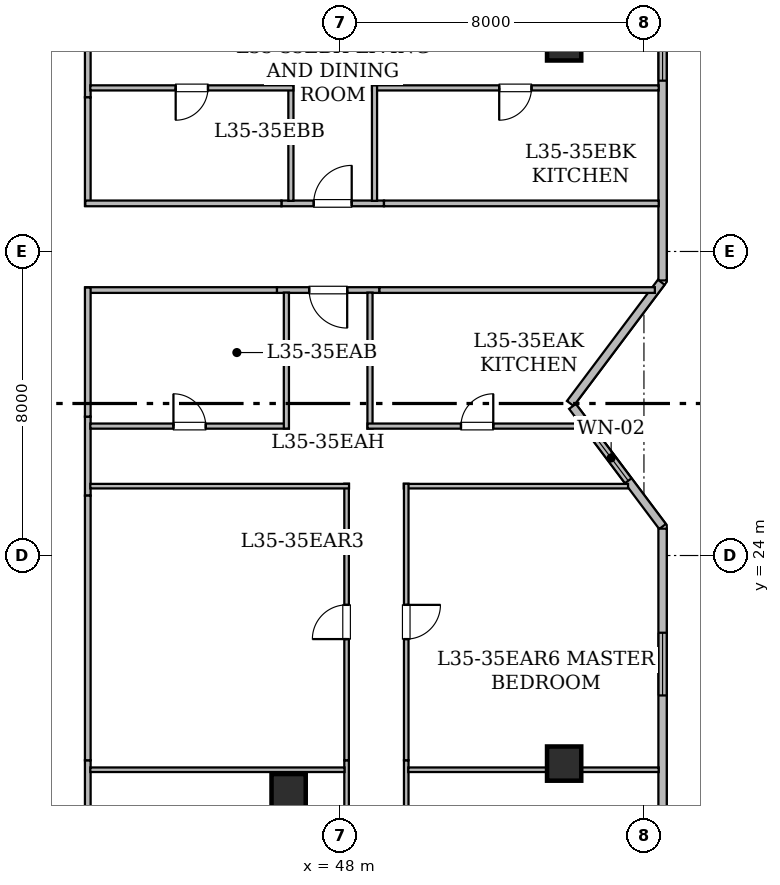
"""IFC4 building model, lengths in metres.
Left out: names, types, materials, properties, quantities, classifications, styles, units other than length and angle.
Written with IfcOpenShell. Run it as: python <this file> out.ifc"""

import sys

from ifc_helpers import new_model, si_unit, direction, frame, frame_2d, origin, origin_2d, place, context, subcontext, project, spatial, rectangle, hollow_rectangle, extrude, element, fill, save


model = new_model("IFC4")
c1 = context("Model", 3, precision=1e-05, world=origin(), true_north=direction((0.0, 1.0)))
c2 = subcontext(c1, "Body", "Model", "MODEL_VIEW")
j1 = project(units=[si_unit("LENGTHUNIT", "METRE"), si_unit("PLANEANGLEUNIT", "RADIAN")], contexts=[c1])
p1 = place(None, origin())
s1 = spatial("IfcSite", under=j1, at=p1, CompositionType="ELEMENT")
p2 = place(p1, origin())
s2 = spatial("IfcBuilding", under=s1, at=p2, CompositionType="ELEMENT")
p3 = place(p2, frame((0.0, 0.0, 138.4)))
s3 = spatial("IfcBuildingStorey", under=s2, at=p3, CompositionType="ELEMENT", Elevation=138.4)
for number, where, z_axis, x_axis in (
    (1, (53.9, 18.525, 0.0), (0.0, 0.0, 1.0), (1.0, 0.0, 0.0)),
    (2, (53.9, 37.475, 0.0), (0.0, 0.0, 1.0), (1.0, 0.0, 0.0)),
    (3, (46.65, 17.8, 0.0), (0.0, 0.0, 1.0), (1.0, 0.0, 0.0)),
):
    element("IfcColumn", number, at=place(p3, frame(where, z_axis=z_axis, x_axis=x_axis)), inside=s3, PredefinedType="COLUMN", context=c2, shape_type="SweptSolid", body=[
        extrude(hollow_rectangle(XDim=0.9, YDim=0.9, WallThickness=0.045, at=origin_2d()), origin(), (0.0, 0.0, 1.0), 3.65),
    ])
p4 = place(p3, frame((56.49, 45.283, 0.0), z_axis=(0.0, 0.0, 1.0), x_axis=(0.0, -1.0, 0.0)))
e4 = element("IfcWall", 4, at=p4, inside=s3, PredefinedType="STANDARD", context=c2, shape_type="SweptSolid", body=[
    extrude(rectangle(XDim=14.046, YDim=0.22, at=frame_2d((7.023, 0.0))), origin(), (0.0, 0.0, 1.0), 3.43),
])
p5 = place(p4, frame((7.589, 0.0, 0.8)))
e5 = element("IfcOpeningElement", 5, at=p5, cuts=e4, PredefinedType="OPENING", context=c2, shape_type="SweptSolid", body=[
    extrude(rectangle(XDim=1.2, YDim=1.5, at=frame_2d((0.6, 0.75))), frame((0.0, 0.12, 0.0), z_axis=(0.0, -1.0, 0.0), x_axis=(1.0, 0.0, 0.0)), (0.0, 0.0, 1.0), 0.24),
])
p6 = place(p4, frame((3.267, 0.0, 0.85)))
e6 = element("IfcOpeningElement", 6, at=p6, cuts=e4, PredefinedType="OPENING", context=c2, shape_type="SweptSolid", body=[
    extrude(rectangle(XDim=1.65, YDim=1.55, at=frame_2d((0.825, 0.775))), frame((0.0, 0.12, 0.0), z_axis=(0.0, -1.0, 0.0), x_axis=(1.0, 0.0, 0.0)), (0.0, 0.0, 1.0), 0.24),
])
p7 = place(p3, frame((56.456, 31.191, 0.0), z_axis=(0.0, 0.0, 1.0), x_axis=(-0.600137081448, -0.799897170561, 0.0)))
e7 = element("IfcWall", 7, at=p7, inside=s3, PredefinedType="STANDARD", context=c2, shape_type="SweptSolid", body=[
    extrude(rectangle(XDim=3.989, YDim=0.22, at=frame_2d((1.995, 0.0))), origin(), (0.0, 0.0, 1.0), 3.43),
])
p8 = place(p3, frame((54.119, 27.924, 0.0), z_axis=(0.0, 0.0, 1.0), x_axis=(0.600039540588, -0.799970343032, 0.0)))
e8 = element("IfcWall", 8, at=p8, inside=s3, PredefinedType="STANDARD", context=c2, shape_type="SweptSolid", body=[
    extrude(rectangle(XDim=3.952, YDim=0.22, at=frame_2d((1.976, 0.0))), origin(), (0.0, 0.0, 1.0), 3.43),
])
p9 = place(p8, frame((0.946, 0.0, 0.85)))
e9 = element("IfcOpeningElement", 9, at=p9, cuts=e8, PredefinedType="OPENING", context=c2, shape_type="SweptSolid", body=[
    extrude(rectangle(XDim=1.5, YDim=1.6, at=frame_2d((0.75, 0.8))), frame((0.0, 0.12, 0.0), z_axis=(0.0, -1.0, 0.0), x_axis=(1.0, 0.0, 0.0)), (0.0, 0.0, 1.0), 0.24),
])
p10 = place(p3, frame((56.49, 24.707, 0.0), z_axis=(0.0, 0.0, 1.0), x_axis=(0.0, -1.0, 0.0)))
e10 = element("IfcWall", 10, at=p10, inside=s3, PredefinedType="STANDARD", context=c2, shape_type="SweptSolid", body=[
    extrude(rectangle(XDim=14.061, YDim=0.22, at=frame_2d((7.031, 0.0))), origin(), (0.0, 0.0, 1.0), 3.43),
])
p11 = place(p10, frame((8.727, 0.0, 0.85)))
e11 = element("IfcOpeningElement", 11, at=p11, cuts=e10, PredefinedType="OPENING", context=c2, shape_type="SweptSolid", body=[
    extrude(rectangle(XDim=1.65, YDim=1.55, at=frame_2d((0.825, 0.775))), frame((0.0, 0.12, 0.0), z_axis=(0.0, -1.0, 0.0), x_axis=(1.0, 0.0, 0.0)), (0.0, 0.0, 1.0), 0.24),
])
p12 = place(p10, frame((2.739, 0.0, 0.85)))
e12 = element("IfcOpeningElement", 12, at=p12, cuts=e10, PredefinedType="OPENING", context=c2, shape_type="SweptSolid", body=[
    extrude(rectangle(XDim=1.65, YDim=1.55, at=frame_2d((0.825, 0.775))), frame((0.0, 0.12, 0.0), z_axis=(0.0, -1.0, 0.0), x_axis=(1.0, 0.0, 0.0)), (0.0, 0.0, 1.0), 0.24),
])
p13 = place(p3, frame((49.04, 30.985, 0.0), z_axis=(0.0, 0.0, 1.0), x_axis=(-1.0, 0.0, 0.0)))
e13 = element("IfcWall", 13, at=p13, inside=s3, PredefinedType="STANDARD", context=c2, shape_type="SweptSolid", body=[
    extrude(rectangle(XDim=2.698, YDim=0.15, at=frame_2d((1.349, 0.0))), origin(), (0.0, 0.0, 1.0), 2.647),
])
p14 = place(p13, frame((0.849, 0.0, 0.0)))
e14 = element("IfcOpeningElement", 14, at=p14, cuts=e13, PredefinedType="OPENING", context=c2, shape_type="SweptSolid", body=[
    extrude(rectangle(XDim=1.0, YDim=2.15, at=frame_2d((0.5, 1.075))), frame((0.0, 0.085, 0.0), z_axis=(0.0, -1.0, 0.0), x_axis=(1.0, 0.0, 0.0)), (0.0, 0.0, 1.0), 0.17),
])
p15 = place(p3, frame((41.365, 27.654, 0.0), z_axis=(0.0, 0.0, 1.0), x_axis=(0.0, -1.0, 0.0)))
e15 = element("IfcWall", 15, at=p15, inside=s3, PredefinedType="STANDARD", context=c2, shape_type="SweptSolid", body=[
    extrude(rectangle(XDim=2.078, YDim=0.15, at=frame_2d((1.039, 0.0))), origin(), (0.0, 0.0, 1.0), 3.43),
])
p16 = place(p3, frame((46.342, 30.985, 0.0), z_axis=(0.0, 0.0, 1.0), x_axis=(-1.0, 0.0, 0.0)))
e16 = element("IfcWall", 16, at=p16, inside=s3, PredefinedType="STANDARD", context=c2, shape_type="SweptSolid", body=[
    extrude(rectangle(XDim=5.042, YDim=0.15, at=frame_2d((2.521, 0.0))), origin(), (0.0, 0.0, 1.0), 3.43),
])
p17 = place(p3, frame((41.365, 31.05, 0.0), z_axis=(0.0, 0.0, 1.0), x_axis=(0.0, -1.0, 0.0)))
e17 = element("IfcWall", 17, at=p17, inside=s3, PredefinedType="STANDARD", context=c2, shape_type="SweptSolid", body=[
    extrude(rectangle(XDim=3.396, YDim=0.15, at=frame_2d((1.698, 0.0))), origin(), (0.0, 0.0, 1.0), 3.013),
])
p18 = place(p3, frame((56.287, 30.985, 0.0), z_axis=(0.0, 0.0, 1.0), x_axis=(-1.0, 0.0, 0.0)))
e18 = element("IfcWall", 18, at=p18, inside=s3, PredefinedType="STANDARD", context=c2, shape_type="SweptSolid", body=[
    extrude(rectangle(XDim=7.247, YDim=0.15, at=frame_2d((3.624, 0.0))), origin(), (0.0, 0.0, 1.0), 2.876),
])
p19 = place(p3, frame((41.365, 18.612, 0.0), z_axis=(0.0, 0.0, 1.0), x_axis=(0.0, -1.0, 0.0)))
e19 = element("IfcWall", 19, at=p19, inside=s3, PredefinedType="STANDARD", context=c2, shape_type="SweptSolid", body=[
    extrude(rectangle(XDim=1.712, YDim=0.15, at=frame_2d((0.856, 0.0))), origin(), (0.0, 0.0, 1.0), 2.647),
])
p20 = place(p3, frame((41.365, 25.576, 0.0), z_axis=(0.0, 0.0, 1.0), x_axis=(0.0, -1.0, 0.0)))
e20 = element("IfcWall", 20, at=p20, inside=s3, PredefinedType="STANDARD", context=c2, shape_type="SweptSolid", body=[
    extrude(rectangle(XDim=6.964, YDim=0.15, at=frame_2d((3.482, 0.0))), origin(), (0.0, 0.0, 1.0), 2.647),
])
p21 = place(p3, frame((41.365, 38.133, 0.0), z_axis=(0.0, 0.0, 1.0), x_axis=(0.0, -1.0, 0.0)))
e21 = element("IfcWall", 21, at=p21, inside=s3, PredefinedType="STANDARD", context=c2, shape_type="SweptSolid", body=[
    extrude(rectangle(XDim=2.078, YDim=0.15, at=frame_2d((1.039, 0.0))), origin(), (0.0, 0.0, 1.0), 2.647),
])
p22 = place(p3, frame((46.461, 33.265, 0.0), z_axis=(0.0, 0.0, 1.0), x_axis=(1.0, 0.0, 0.0)))
e22 = element("IfcWall", 22, at=p22, inside=s3, PredefinedType="STANDARD", context=c2, shape_type="SweptSolid", body=[
    extrude(rectangle(XDim=2.698, YDim=0.15, at=frame_2d((1.349, 0.0))), origin(), (0.0, 0.0, 1.0), 2.647),
])
p23 = place(p22, frame((0.849, 0.0, 0.0)))
e23 = element("IfcOpeningElement", 23, at=p23, cuts=e22, PredefinedType="OPENING", context=c2, shape_type="SweptSolid", body=[
    extrude(rectangle(XDim=1.0, YDim=2.15, at=frame_2d((0.5, 1.075))), frame((0.0, 0.085, 0.0), z_axis=(0.0, -1.0, 0.0), x_axis=(1.0, 0.0, 0.0)), (0.0, 0.0, 1.0), 0.17),
])
p24 = place(p3, frame((41.365, 36.055, 0.0), z_axis=(0.0, 0.0, 1.0), x_axis=(0.0, -1.0, 0.0)))
e24 = element("IfcWall", 24, at=p24, inside=s3, PredefinedType="STANDARD", context=c2, shape_type="SweptSolid", body=[
    extrude(rectangle(XDim=2.855, YDim=0.15, at=frame_2d((1.427, 0.0))), origin(), (0.0, 0.0, 1.0), 3.43),
])
p25 = place(p3, frame((41.3, 33.265, 0.0), z_axis=(0.0, 0.0, 1.0), x_axis=(1.0, 0.0, 0.0)))
e25 = element("IfcWall", 25, at=p25, inside=s3, PredefinedType="STANDARD", context=c2, shape_type="SweptSolid", body=[
    extrude(rectangle(XDim=5.161, YDim=0.15, at=frame_2d((2.581, 0.0))), origin(), (0.0, 0.0, 1.0), 2.647),
])
p26 = place(p3, frame((49.159, 33.265, 0.0), z_axis=(0.0, 0.0, 1.0), x_axis=(1.0, 0.0, 0.0)))
e26 = element("IfcWall", 26, at=p26, inside=s3, PredefinedType="STANDARD", context=c2, shape_type="SweptSolid", body=[
    extrude(rectangle(XDim=7.229, YDim=0.15, at=frame_2d((3.615, 0.0))), origin(), (0.0, 0.0, 1.0), 2.876),
])
p27 = place(p3, frame((41.432, 27.405, 0.0), z_axis=(0.0, 0.0, 1.0), x_axis=(1.0, 0.0, 0.0)))
e27 = element("IfcWall", 27, at=p27, inside=s3, PredefinedType="PARTITIONING", context=c2, shape_type="SweptSolid", body=[
    extrude(rectangle(XDim=5.224, YDim=0.135, at=frame_2d((2.612, 0.0))), origin(), (0.0, 0.0, 1.0), 2.647),
])
p28 = place(p27, frame((2.187, 0.0, 0.0)))
e28 = element("IfcOpeningElement", 28, at=p28, cuts=e27, PredefinedType="OPENING", context=c2, shape_type="SweptSolid", body=[
    extrude(rectangle(XDim=0.85, YDim=2.1, at=frame_2d((0.425, 1.05))), frame((0.0, 0.077, 0.0), z_axis=(0.0, -1.0, 0.0), x_axis=(1.0, 0.0, 0.0)), (0.0, 0.0, 1.0), 0.155),
])
p29 = place(p3, frame((46.591, 27.34, 0.0), z_axis=(0.0, 0.0, 1.0), x_axis=(0.0, 1.0, 0.0)))
e29 = element("IfcWall", 29, at=p29, inside=s3, PredefinedType="PARTITIONING", context=c2, shape_type="SweptSolid", body=[
    extrude(rectangle(XDim=3.578, YDim=0.135, at=frame_2d((1.789, 0.0))), origin(), (0.0, 0.0, 1.0), 2.647),
])
p30 = place(p3, frame((48.791, 30.918, 0.0), z_axis=(0.0, 0.0, 1.0), x_axis=(0.0, -1.0, 0.0)))
e30 = element("IfcWall", 30, at=p30, inside=s3, PredefinedType="PARTITIONING", context=c2, shape_type="SweptSolid", body=[
    extrude(rectangle(XDim=3.578, YDim=0.135, at=frame_2d((1.789, 0.0))), origin(), (0.0, 0.0, 1.0), 3.43),
])
p31 = place(p3, frame((48.726, 27.405, 0.0), z_axis=(0.0, 0.0, 1.0), x_axis=(1.0, 0.0, 0.0)))
e31 = element("IfcWall", 31, at=p31, inside=s3, PredefinedType="PARTITIONING", context=c2, shape_type="SweptSolid", body=[
    extrude(rectangle(XDim=5.768, YDim=0.135, at=frame_2d((2.884, 0.0))), origin(), (0.0, 0.0, 1.0), 2.876),
])
p32 = place(p31, frame((2.459, 0.0, 0.0)))
e32 = element("IfcOpeningElement", 32, at=p32, cuts=e31, PredefinedType="OPENING", context=c2, shape_type="SweptSolid", body=[
    extrude(rectangle(XDim=0.85, YDim=2.1, at=frame_2d((0.425, 1.05))), frame((0.0, 0.077, 0.0), z_axis=(0.0, -1.0, 0.0), x_axis=(1.0, 0.0, 0.0)), (0.0, 0.0, 1.0), 0.155),
])
p33 = place(p3, frame((48.175, 12.196, 0.0), z_axis=(0.0, 0.0, 1.0), x_axis=(0.0, 1.0, 0.0)))
e33 = element("IfcWall", 33, at=p33, inside=s3, PredefinedType="PARTITIONING", context=c2, shape_type="SweptSolid", body=[
    extrude(rectangle(XDim=6.416, YDim=0.12, at=frame_2d((3.208, 0.0))), origin(), (0.0, 0.0, 1.0), 2.647),
])
p34 = place(p33, frame((2.737, 0.0, 0.0)))
e34 = element("IfcOpeningElement", 34, at=p34, cuts=e33, PredefinedType="OPENING", context=c2, shape_type="SweptSolid", body=[
    extrude(rectangle(XDim=0.9, YDim=2.1, at=frame_2d((0.45, 1.05))), frame((0.0, 0.07, 0.0), z_axis=(0.0, -1.0, 0.0), x_axis=(1.0, 0.0, 0.0)), (0.0, 0.0, 1.0), 0.14),
])
p35 = place(p3, frame((48.175, 18.612, 0.0), z_axis=(0.0, 0.0, 1.0), x_axis=(0.0, 1.0, 0.0)))
e35 = element("IfcWall", 35, at=p35, inside=s3, PredefinedType="PARTITIONING", context=c2, shape_type="SweptSolid", body=[
    extrude(rectangle(XDim=7.278, YDim=0.12, at=frame_2d((3.639, 0.0))), origin(), (0.0, 0.0, 1.0), 3.43),
])
p36 = place(p35, frame((3.189, 0.0, 0.0)))
e36 = element("IfcOpeningElement", 36, at=p36, cuts=e35, PredefinedType="OPENING", context=c2, shape_type="SweptSolid", body=[
    extrude(rectangle(XDim=0.9, YDim=2.1, at=frame_2d((0.45, 1.05))), frame((0.0, 0.07, 0.0), z_axis=(0.0, -1.0, 0.0), x_axis=(1.0, 0.0, 0.0)), (0.0, 0.0, 1.0), 0.14),
])
p37 = place(p3, frame((48.24, 25.825, 0.0), z_axis=(0.0, 0.0, 1.0), x_axis=(-1.0, 0.0, 0.0)))
e37 = element("IfcWall", 37, at=p37, inside=s3, PredefinedType="PARTITIONING", context=c2, shape_type="SweptSolid", body=[
    extrude(rectangle(XDim=6.808, YDim=0.12, at=frame_2d((3.404, 0.0))), origin(), (0.0, 0.0, 1.0), 2.647),
])
p38 = place(p3, frame((49.745, 18.612, 0.0), z_axis=(0.0, 0.0, 1.0), x_axis=(0.0, -1.0, 0.0)))
e38 = element("IfcWall", 38, at=p38, inside=s3, PredefinedType="PARTITIONING", context=c2, shape_type="SweptSolid", body=[
    extrude(rectangle(XDim=6.416, YDim=0.12, at=frame_2d((3.208, 0.0))), origin(), (0.0, 0.0, 1.0), 2.647),
])
p39 = place(p38, frame((2.779, 0.0, 0.0)))
e39 = element("IfcOpeningElement", 39, at=p39, cuts=e38, PredefinedType="OPENING", context=c2, shape_type="SweptSolid", body=[
    extrude(rectangle(XDim=0.9, YDim=2.1, at=frame_2d((0.45, 1.05))), frame((0.0, 0.07, 0.0), z_axis=(0.0, -1.0, 0.0), x_axis=(1.0, 0.0, 0.0)), (0.0, 0.0, 1.0), 0.14),
])
p40 = place(p3, frame((55.582, 25.825, 0.0), z_axis=(0.0, 0.0, 1.0), x_axis=(-1.0, 0.0, 0.0)))
e40 = element("IfcWall", 40, at=p40, inside=s3, PredefinedType="PARTITIONING", context=c2, shape_type="SweptSolid", body=[
    extrude(rectangle(XDim=5.902, YDim=0.12, at=frame_2d((2.951, 0.0))), origin(), (0.0, 0.0, 1.0), 2.876),
])
p41 = place(p3, frame((49.745, 25.89, 0.0), z_axis=(0.0, 0.0, 1.0), x_axis=(0.0, -1.0, 0.0)))
e41 = element("IfcWall", 41, at=p41, inside=s3, PredefinedType="PARTITIONING", context=c2, shape_type="SweptSolid", body=[
    extrude(rectangle(XDim=7.278, YDim=0.12, at=frame_2d((3.639, 0.0))), origin(), (0.0, 0.0, 1.0), 3.43),
])
p42 = place(p41, frame((3.189, 0.0, 0.0)))
e42 = element("IfcOpeningElement", 42, at=p42, cuts=e41, PredefinedType="OPENING", context=c2, shape_type="SweptSolid", body=[
    extrude(rectangle(XDim=0.9, YDim=2.1, at=frame_2d((0.45, 1.05))), frame((0.0, 0.07, 0.0), z_axis=(0.0, -1.0, 0.0), x_axis=(1.0, 0.0, 0.0)), (0.0, 0.0, 1.0), 0.14),
])
p43 = place(p3, frame((41.432, 18.363, 0.0), z_axis=(0.0, 0.0, 1.0), x_axis=(1.0, 0.0, 0.0)))
e43 = element("IfcWall", 43, at=p43, inside=s3, PredefinedType="PARTITIONING", context=c2, shape_type="SweptSolid", body=[
    extrude(rectangle(XDim=6.689, YDim=0.12, at=frame_2d((3.345, 0.0))), origin(), (0.0, 0.0, 1.0), 2.647),
])
p44 = place(p3, frame((49.799, 18.363, 0.0), z_axis=(0.0, 0.0, 1.0), x_axis=(1.0, 0.0, 0.0)))
e44 = element("IfcWall", 44, at=p44, inside=s3, PredefinedType="PARTITIONING", context=c2, shape_type="SweptSolid", body=[
    extrude(rectangle(XDim=6.589, YDim=0.12, at=frame_2d((3.294, 0.0))), origin(), (0.0, 0.0, 1.0), 2.647),
])
p45 = place(p3, frame((46.71, 33.332, 0.0), z_axis=(0.0, 0.0, 1.0), x_axis=(0.0, 1.0, 0.0)))
e45 = element("IfcWall", 45, at=p45, inside=s3, PredefinedType="PARTITIONING", context=c2, shape_type="SweptSolid", body=[
    extrude(rectangle(XDim=3.037, YDim=0.135, at=frame_2d((1.519, 0.0))), origin(), (0.0, 0.0, 1.0), 2.647),
])
p46 = place(p3, frame((46.775, 36.304, 0.0), z_axis=(0.0, 0.0, 1.0), x_axis=(-1.0, 0.0, 0.0)))
e46 = element("IfcWall", 46, at=p46, inside=s3, PredefinedType="PARTITIONING", context=c2, shape_type="SweptSolid", body=[
    extrude(rectangle(XDim=5.343, YDim=0.135, at=frame_2d((2.671, 0.0))), origin(), (0.0, 0.0, 1.0), 2.647),
])
p47 = place(p46, frame((2.247, 0.0, 0.0)))
e47 = element("IfcOpeningElement", 47, at=p47, cuts=e46, PredefinedType="OPENING", context=c2, shape_type="SweptSolid", body=[
    extrude(rectangle(XDim=0.85, YDim=2.1, at=frame_2d((0.425, 1.05))), frame((0.0, 0.077, 0.0), z_axis=(0.0, -1.0, 0.0), x_axis=(1.0, 0.0, 0.0)), (0.0, 0.0, 1.0), 0.155),
])
p48 = place(p3, frame((56.388, 36.304, 0.0), z_axis=(0.0, 0.0, 1.0), x_axis=(-1.0, 0.0, 0.0)))
e48 = element("IfcWall", 48, at=p48, inside=s3, PredefinedType="PARTITIONING", context=c2, shape_type="SweptSolid", body=[
    extrude(rectangle(XDim=7.543, YDim=0.135, at=frame_2d((3.771, 0.0))), origin(), (0.0, 0.0, 1.0), 2.876),
])
p49 = place(p48, frame((3.347, 0.0, 0.0)))
e49 = element("IfcOpeningElement", 49, at=p49, cuts=e48, PredefinedType="OPENING", context=c2, shape_type="SweptSolid", body=[
    extrude(rectangle(XDim=0.85, YDim=2.1, at=frame_2d((0.425, 1.05))), frame((0.0, 0.077, 0.0), z_axis=(0.0, -1.0, 0.0), x_axis=(1.0, 0.0, 0.0)), (0.0, 0.0, 1.0), 0.155),
])
p50 = place(p3, frame((48.91, 36.369, 0.0), z_axis=(0.0, 0.0, 1.0), x_axis=(0.0, -1.0, 0.0)))
e50 = element("IfcWall", 50, at=p50, inside=s3, PredefinedType="PARTITIONING", context=c2, shape_type="SweptSolid", body=[
    extrude(rectangle(XDim=3.037, YDim=0.135, at=frame_2d((1.519, 0.0))), origin(), (0.0, 0.0, 1.0), 3.43),
])
p51 = place(p9, origin())
e51 = element("IfcWindow", 51, at=p51, inside=s3, PartitioningType="SINGLE_PANEL", PredefinedType="WINDOW", context=c2, shape_type="SweptSolid", body=[
    extrude(rectangle(XDim=1.5, YDim=1.6, at=frame_2d((0.75, 0.8))), frame((0.0, 0.03, 0.0), z_axis=(0.0, -1.0, 0.0), x_axis=(1.0, 0.0, 0.0)), (0.0, 0.0, 1.0), 0.06),
])
fill(e9, e51)
p52 = place(p12, origin())
e52 = element("IfcWindow", 52, at=p52, inside=s3, PartitioningType="SINGLE_PANEL", PredefinedType="WINDOW", context=c2, shape_type="SweptSolid", body=[
    extrude(rectangle(XDim=1.65, YDim=1.55, at=frame_2d((0.825, 0.775))), frame((0.0, 0.03, 0.0), z_axis=(0.0, -1.0, 0.0), x_axis=(1.0, 0.0, 0.0)), (0.0, 0.0, 1.0), 0.06),
])
fill(e12, e52)
p53 = place(p5, origin())
e53 = element("IfcWindow", 53, at=p53, inside=s3, PartitioningType="SINGLE_PANEL", PredefinedType="WINDOW", context=c2, shape_type="SweptSolid", body=[
    extrude(rectangle(XDim=1.2, YDim=1.5, at=frame_2d((0.6, 0.75))), frame((0.0, 0.03, 0.0), z_axis=(0.0, -1.0, 0.0), x_axis=(1.0, 0.0, 0.0)), (0.0, 0.0, 1.0), 0.06),
])
fill(e5, e53)
p54 = place(p14, origin())
e54 = element("IfcDoor", 54, at=p54, inside=s3, OperationType="SINGLE_SWING_LEFT", PredefinedType="DOOR", context=c2, shape_type="SweptSolid", body=[
    extrude(rectangle(XDim=1.0, YDim=2.15, at=frame_2d((0.5, 1.075))), frame((0.0, 0.025, 0.0), z_axis=(0.0, -1.0, 0.0), x_axis=(1.0, 0.0, 0.0)), (0.0, 0.0, 1.0), 0.05),
])
fill(e14, e54)
p55 = place(p23, origin())
e55 = element("IfcDoor", 55, at=p55, inside=s3, OperationType="SINGLE_SWING_RIGHT", PredefinedType="DOOR", context=c2, shape_type="SweptSolid", body=[
    extrude(rectangle(XDim=1.0, YDim=2.15, at=frame_2d((0.5, 1.075))), frame((0.0, 0.025, 0.0), z_axis=(0.0, -1.0, 0.0), x_axis=(1.0, 0.0, 0.0)), (0.0, 0.0, 1.0), 0.05),
])
fill(e23, e55)
p56 = place(p28, origin())
e56 = element("IfcDoor", 56, at=p56, inside=s3, OperationType="SINGLE_SWING_LEFT", PredefinedType="DOOR", context=c2, shape_type="SweptSolid", body=[
    extrude(rectangle(XDim=0.85, YDim=2.1, at=frame_2d((0.425, 1.05))), frame((0.0, 0.025, 0.0), z_axis=(0.0, -1.0, 0.0), x_axis=(1.0, 0.0, 0.0)), (0.0, 0.0, 1.0), 0.05),
])
fill(e28, e56)
p57 = place(p32, origin())
e57 = element("IfcDoor", 57, at=p57, inside=s3, OperationType="SINGLE_SWING_RIGHT", PredefinedType="DOOR", context=c2, shape_type="SweptSolid", body=[
    extrude(rectangle(XDim=0.85, YDim=2.1, at=frame_2d((0.425, 1.05))), frame((0.0, 0.025, 0.0), z_axis=(0.0, -1.0, 0.0), x_axis=(1.0, 0.0, 0.0)), (0.0, 0.0, 1.0), 0.05),
])
fill(e32, e57)
p58 = place(p36, origin())
e58 = element("IfcDoor", 58, at=p58, inside=s3, OperationType="SINGLE_SWING_LEFT", PredefinedType="DOOR", context=c2, shape_type="SweptSolid", body=[
    extrude(rectangle(XDim=0.9, YDim=2.1, at=frame_2d((0.45, 1.05))), frame((0.0, 0.025, 0.0), z_axis=(0.0, -1.0, 0.0), x_axis=(1.0, 0.0, 0.0)), (0.0, 0.0, 1.0), 0.05),
])
fill(e36, e58)
p59 = place(p42, origin())
e59 = element("IfcDoor", 59, at=p59, inside=s3, OperationType="SINGLE_SWING_LEFT", PredefinedType="DOOR", context=c2, shape_type="SweptSolid", body=[
    extrude(rectangle(XDim=0.9, YDim=2.1, at=frame_2d((0.45, 1.05))), frame((0.0, 0.025, 0.0), z_axis=(0.0, -1.0, 0.0), x_axis=(1.0, 0.0, 0.0)), (0.0, 0.0, 1.0), 0.05),
])
fill(e42, e59)
p60 = place(p47, origin())
e60 = element("IfcDoor", 60, at=p60, inside=s3, OperationType="SINGLE_SWING_RIGHT", PredefinedType="DOOR", context=c2, shape_type="SweptSolid", body=[
    extrude(rectangle(XDim=0.85, YDim=2.1, at=frame_2d((0.425, 1.05))), frame((0.0, 0.025, 0.0), z_axis=(0.0, -1.0, 0.0), x_axis=(1.0, 0.0, 0.0)), (0.0, 0.0, 1.0), 0.05),
])
fill(e47, e60)
p61 = place(p49, origin())
e61 = element("IfcDoor", 61, at=p61, inside=s3, OperationType="SINGLE_SWING_RIGHT", PredefinedType="DOOR", context=c2, shape_type="SweptSolid", body=[
    extrude(rectangle(XDim=0.85, YDim=2.1, at=frame_2d((0.425, 1.05))), frame((0.0, 0.025, 0.0), z_axis=(0.0, -1.0, 0.0), x_axis=(1.0, 0.0, 0.0)), (0.0, 0.0, 1.0), 0.05),
])
fill(e49, e61)
save(model, sys.argv[1])
